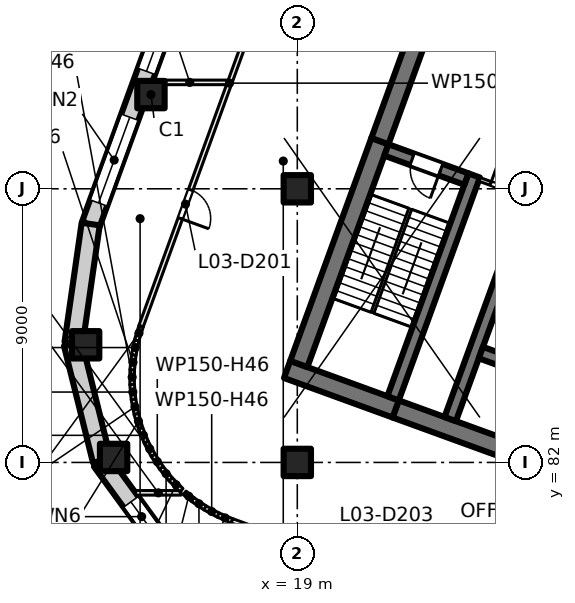
"""IFC4 building model, lengths in metres.
Left out: names, types, materials, properties, quantities, classifications, styles, units other than length and angle.
Written with IfcOpenShell. Run it as: python <this file> out.ifc"""

import sys

from ifc_helpers import new_model, si_unit, direction, frame, frame_2d, origin, origin_2d, place, context, subcontext, project, spatial, rectangle, extrude, element, fill, save


model = new_model("IFC4")
c1 = context("Model", 3, precision=1e-05, world=origin(), true_north=direction((0.0, 1.0)))
c2 = subcontext(c1, "Body", "Model", "MODEL_VIEW")
j1 = project(units=[si_unit("LENGTHUNIT", "METRE"), si_unit("PLANEANGLEUNIT", "RADIAN")], contexts=[c1])
p1 = place(None, origin())
s1 = spatial("IfcSite", under=j1, at=p1, CompositionType="ELEMENT")
p2 = place(p1, origin())
s2 = spatial("IfcBuilding", under=s1, at=p2, CompositionType="ELEMENT")
p3 = place(p2, frame((0.0, 0.0, 17.5)))
s3 = spatial("IfcBuildingStorey", under=s2, at=p3, CompositionType="ELEMENT", Elevation=17.5)
for number, where, z_axis, x_axis in (
    (1, (19.0, 82.0, 0.0), (0.0, 0.0, 1.0), (1.0, 0.0, 0.0)),
    (2, (19.0, 91.0, 0.0), (0.0, 0.0, 1.0), (1.0, 0.0, 0.0)),
    (3, (12.958, 82.164, 0.0), (0.0, 0.0, 1.0), (1.0, 0.0, 0.0)),
    (4, (12.038, 85.869, 0.0), (0.0, 0.0, 1.0), (1.0, 0.0, 0.0)),
    (5, (14.187, 94.099, 0.0), (0.0, 0.0, 1.0), (1.0, 0.0, 0.0)),
):
    element("IfcColumn", number, at=place(p3, frame(where, z_axis=z_axis, x_axis=x_axis)), inside=s3, PredefinedType="COLUMN", context=c2, shape_type="SweptSolid", body=[
        extrude(rectangle(XDim=0.9, YDim=0.9, at=origin_2d()), origin(), (0.0, 0.0, 1.0), 5.0),
    ])
p4 = place(p3, frame((35.767, 78.835, 0.0), z_axis=(0.0, 0.0, 1.0), x_axis=(-0.939692894512, 0.342019391267, 0.0)))
e6 = element("IfcWall", 6, at=p4, inside=s3, PredefinedType="SHEAR", context=c2, shape_type="SweptSolid", body=[
    extrude(rectangle(XDim=14.4, YDim=0.6, at=frame_2d((7.2, 0.0))), origin(), (0.0, 0.0, 1.0), 5.0),
])
p5 = place(p3, frame((22.236, 83.76, 0.0), z_axis=(0.0, 0.0, 1.0), x_axis=(-0.939680822529, 0.342052557032, 0.0)))
e7 = element("IfcWall", 7, at=p5, inside=s3, PredefinedType="SHEAR", context=c2, shape_type="SweptSolid", body=[
    extrude(rectangle(XDim=3.8, YDim=0.6, at=frame_2d((1.9, 0.0))), origin(), (0.0, 0.0, 1.0), 5.0),
])
p6 = place(p3, frame((19.05, 85.239, 0.0), z_axis=(0.0, 0.0, 1.0), x_axis=(0.342016982193, 0.939693771338, 0.0)))
e8 = element("IfcWall", 8, at=p6, inside=s3, PredefinedType="SHEAR", context=c2, shape_type="SweptSolid", body=[
    extrude(rectangle(XDim=7.8, YDim=0.6, at=frame_2d((3.9, 0.0))), origin(), (0.0, 0.0, 1.0), 5.0),
])
p7 = place(p3, frame((21.717, 92.568, 0.0), z_axis=(0.0, 0.0, 1.0), x_axis=(0.342016162452, 0.939694069696, 0.0)))
e9 = element("IfcWall", 9, at=p7, inside=s3, PredefinedType="SHEAR", context=c2, shape_type="SweptSolid", body=[
    extrude(rectangle(XDim=8.9, YDim=0.6, at=frame_2d((4.45, 0.0))), origin(), (0.0, 0.0, 1.0), 5.0),
])
p8 = place(p3, frame((22.15, 84.11, 0.0), z_axis=(0.0, 0.0, 1.0), x_axis=(0.342016982193, 0.939693771338, 0.0)))
e10 = element("IfcWall", 10, at=p8, inside=s3, PredefinedType="SHEAR", context=c2, shape_type="SweptSolid", body=[
    extrude(rectangle(XDim=7.8, YDim=0.4, at=frame_2d((3.9, 0.0))), origin(), (0.0, 0.0, 1.0), 5.0),
])
p9 = place(p3, frame((24.562, 91.32, 0.0), z_axis=(0.0, 0.0, 1.0), x_axis=(-0.939717030584, 0.341953070509, 0.0)))
e11 = element("IfcWall", 11, at=p9, inside=s3, PredefinedType="SHEAR", context=c2, shape_type="SweptSolid", body=[
    extrude(rectangle(XDim=2.8, YDim=0.4, at=frame_2d((1.4, 0.0))), origin(), (0.0, 0.0, 1.0), 5.0),
])
p10 = place(p9, frame((0.9, 0.0, 0.0)))
e12 = element("IfcOpeningElement", 12, at=p10, cuts=e11, PredefinedType="OPENING", context=c2, shape_type="SweptSolid", body=[
    extrude(rectangle(XDim=1.0, YDim=2.1, at=frame_2d((0.5, 1.05))), frame((0.0, 0.21, 0.0), z_axis=(0.0, -1.0, 0.0), x_axis=(1.0, 0.0, 0.0)), (0.0, 0.0, 1.0), 0.42),
])
p11 = place(p3, frame((24.03, 83.426, 0.0), z_axis=(0.0, 0.0, 1.0), x_axis=(0.342014590177, 0.939694641948, 0.0)))
e13 = element("IfcWall", 13, at=p11, inside=s3, PredefinedType="SHEAR", context=c2, shape_type="SweptSolid", body=[
    extrude(rectangle(XDim=12.2, YDim=0.4, at=frame_2d((6.1, 0.0))), origin(), (0.0, 0.0, 1.0), 5.0),
])
p12 = place(p11, frame((7.9, 0.0, 0.0)))
e14 = element("IfcOpeningElement", 14, at=p12, cuts=e13, PredefinedType="OPENING", context=c2, shape_type="SweptSolid", body=[
    extrude(rectangle(XDim=1.1, YDim=2.1, at=frame_2d((0.55, 1.05))), frame((0.0, 0.21, 0.0), z_axis=(0.0, -1.0, 0.0), x_axis=(1.0, 0.0, 0.0)), (0.0, 0.0, 1.0), 0.42),
])
p13 = place(p3, frame((27.858, 84.587, 0.0), z_axis=(0.0, 0.0, 1.0), x_axis=(-0.939686455819, 0.342037080957, 0.0)))
e15 = element("IfcWall", 15, at=p13, inside=s3, PredefinedType="SHEAR", context=c2, shape_type="SweptSolid", body=[
    extrude(rectangle(XDim=3.0, YDim=0.4, at=frame_2d((1.5, 0.0))), origin(), (0.0, 0.0, 1.0), 5.0),
])
p14 = place(p3, frame((12.199, 89.809, 0.0), z_axis=(0.0, 0.0, 1.0), x_axis=(0.342022998908, 0.939691581434, 0.0)))
e16 = element("IfcWall", 16, at=p14, inside=s3, PredefinedType="SOLIDWALL", context=c2, shape_type="SweptSolid", body=[
    extrude(rectangle(XDim=47.334, YDim=0.6, at=frame_2d((23.667, 0.0))), origin(), (0.0, 0.0, 1.0), 4.6),
])
p15 = place(p14, frame((0.773, 0.0, 0.9)))
e17 = element("IfcOpeningElement", 17, at=p15, cuts=e16, PredefinedType="OPENING", context=c2, shape_type="SweptSolid", body=[
    extrude(rectangle(XDim=3.0, YDim=3.0, at=frame_2d((1.5, 1.5))), frame((0.0, 0.31, 0.0), z_axis=(0.0, -1.0, 0.0), x_axis=(1.0, 0.0, 0.0)), (0.0, 0.0, 1.0), 0.62),
])
p16 = place(p14, frame((5.379, 0.0, 0.9)))
e18 = element("IfcOpeningElement", 18, at=p16, cuts=e16, PredefinedType="OPENING", context=c2, shape_type="SweptSolid", body=[
    extrude(rectangle(XDim=3.0, YDim=3.0, at=frame_2d((1.5, 1.5))), frame((0.0, 0.31, 0.0), z_axis=(0.0, -1.0, 0.0), x_axis=(1.0, 0.0, 0.0)), (0.0, 0.0, 1.0), 0.62),
])
p17 = place(p14, frame((9.235, 0.0, 0.9)))
e19 = element("IfcOpeningElement", 19, at=p17, cuts=e16, PredefinedType="OPENING", context=c2, shape_type="SweptSolid", body=[
    extrude(rectangle(XDim=3.0, YDim=3.0, at=frame_2d((1.5, 1.5))), frame((0.0, 0.31, 0.0), z_axis=(0.0, -1.0, 0.0), x_axis=(1.0, 0.0, 0.0)), (0.0, 0.0, 1.0), 0.62),
])
p18 = place(p14, frame((13.99, 0.0, 0.9)))
e20 = element("IfcOpeningElement", 20, at=p18, cuts=e16, PredefinedType="OPENING", context=c2, shape_type="SweptSolid", body=[
    extrude(rectangle(XDim=3.0, YDim=3.0, at=frame_2d((1.5, 1.5))), frame((0.0, 0.31, 0.0), z_axis=(0.0, -1.0, 0.0), x_axis=(1.0, 0.0, 0.0)), (0.0, 0.0, 1.0), 0.62),
])
p19 = place(p14, frame((18.118, 0.0, 0.9)))
e21 = element("IfcOpeningElement", 21, at=p19, cuts=e16, PredefinedType="OPENING", context=c2, shape_type="SweptSolid", body=[
    extrude(rectangle(XDim=1.2, YDim=3.0, at=frame_2d((0.6, 1.5))), frame((0.0, 0.31, 0.0), z_axis=(0.0, -1.0, 0.0), x_axis=(1.0, 0.0, 0.0)), (0.0, 0.0, 1.0), 0.62),
])
p20 = place(p14, frame((19.618, 0.0, 0.9)))
e22 = element("IfcOpeningElement", 22, at=p20, cuts=e16, PredefinedType="OPENING", context=c2, shape_type="SweptSolid", body=[
    extrude(rectangle(XDim=1.2, YDim=3.0, at=frame_2d((0.6, 1.5))), frame((0.0, 0.31, 0.0), z_axis=(0.0, -1.0, 0.0), x_axis=(1.0, 0.0, 0.0)), (0.0, 0.0, 1.0), 0.62),
])
p21 = place(p14, frame((22.452, 0.0, 0.9)))
e23 = element("IfcOpeningElement", 23, at=p21, cuts=e16, PredefinedType="OPENING", context=c2, shape_type="SweptSolid", body=[
    extrude(rectangle(XDim=3.0, YDim=3.0, at=frame_2d((1.5, 1.5))), frame((0.0, 0.31, 0.0), z_axis=(0.0, -1.0, 0.0), x_axis=(1.0, 0.0, 0.0)), (0.0, 0.0, 1.0), 0.62),
])
p22 = place(p14, frame((26.458, 0.0, 0.9)))
e24 = element("IfcOpeningElement", 24, at=p22, cuts=e16, PredefinedType="OPENING", context=c2, shape_type="SweptSolid", body=[
    extrude(rectangle(XDim=3.0, YDim=3.0, at=frame_2d((1.5, 1.5))), frame((0.0, 0.31, 0.0), z_axis=(0.0, -1.0, 0.0), x_axis=(1.0, 0.0, 0.0)), (0.0, 0.0, 1.0), 0.62),
])
p23 = place(p14, frame((32.484, 0.0, 0.9)))
e25 = element("IfcOpeningElement", 25, at=p23, cuts=e16, PredefinedType="OPENING", context=c2, shape_type="SweptSolid", body=[
    extrude(rectangle(XDim=1.2, YDim=3.0, at=frame_2d((0.6, 1.5))), frame((0.0, 0.31, 0.0), z_axis=(0.0, -1.0, 0.0), x_axis=(1.0, 0.0, 0.0)), (0.0, 0.0, 1.0), 0.62),
])
p24 = place(p14, frame((35.07, 0.0, 0.9)))
e26 = element("IfcOpeningElement", 26, at=p24, cuts=e16, PredefinedType="OPENING", context=c2, shape_type="SweptSolid", body=[
    extrude(rectangle(XDim=3.0, YDim=3.0, at=frame_2d((1.5, 1.5))), frame((0.0, 0.31, 0.0), z_axis=(0.0, -1.0, 0.0), x_axis=(1.0, 0.0, 0.0)), (0.0, 0.0, 1.0), 0.62),
])
p25 = place(p14, frame((39.676, 0.0, 0.9)))
e27 = element("IfcOpeningElement", 27, at=p25, cuts=e16, PredefinedType="OPENING", context=c2, shape_type="SweptSolid", body=[
    extrude(rectangle(XDim=3.0, YDim=3.0, at=frame_2d((1.5, 1.5))), frame((0.0, 0.31, 0.0), z_axis=(0.0, -1.0, 0.0), x_axis=(1.0, 0.0, 0.0)), (0.0, 0.0, 1.0), 0.62),
])
p26 = place(p14, frame((43.531, 0.0, 0.9)))
e28 = element("IfcOpeningElement", 28, at=p26, cuts=e16, PredefinedType="OPENING", context=c2, shape_type="SweptSolid", body=[
    extrude(rectangle(XDim=3.0, YDim=3.0, at=frame_2d((1.5, 1.5))), frame((0.0, 0.31, 0.0), z_axis=(0.0, -1.0, 0.0), x_axis=(1.0, 0.0, 0.0)), (0.0, 0.0, 1.0), 0.62),
])
p27 = place(p3, frame((11.641, 85.92, 0.0), z_axis=(0.0, 0.0, 1.0), x_axis=(0.142240980655, 0.989832058191, 0.0)))
e29 = element("IfcWall", 29, at=p27, inside=s3, PredefinedType="SOLIDWALL", context=c2, shape_type="SweptSolid", body=[
    extrude(rectangle(XDim=3.961, YDim=0.6, at=frame_2d((1.981, 0.0))), origin(), (0.0, 0.0, 1.0), 4.6),
])
p28 = place(p3, frame((12.571, 82.061, 0.0), z_axis=(0.0, 0.0, 1.0), x_axis=(-0.240896747667, 0.970550749298, 0.0)))
e30 = element("IfcWall", 30, at=p28, inside=s3, PredefinedType="SOLIDWALL", context=c2, shape_type="SweptSolid", body=[
    extrude(rectangle(XDim=3.962, YDim=0.6, at=frame_2d((1.981, 0.0))), origin(), (0.0, 0.0, 1.0), 4.6),
])
p29 = place(p3, frame((14.885, 78.837, 0.0), z_axis=(0.0, 0.0, 1.0), x_axis=(-0.588600339707, 0.808424170901, 0.0)))
e31 = element("IfcWall", 31, at=p29, inside=s3, PredefinedType="SOLIDWALL", context=c2, shape_type="SweptSolid", body=[
    extrude(rectangle(XDim=3.962, YDim=0.6, at=frame_2d((1.981, 0.0))), origin(), (0.0, 0.0, 1.0), 4.6),
])
p30 = place(p29, frame((1.108, 0.0, 0.9)))
e32 = element("IfcOpeningElement", 32, at=p30, cuts=e31, PredefinedType="OPENING", context=c2, shape_type="SweptSolid", body=[
    extrude(rectangle(XDim=1.2, YDim=3.0, at=frame_2d((0.6, 1.5))), frame((0.0, 0.31, 0.0), z_axis=(0.0, -1.0, 0.0), x_axis=(1.0, 0.0, 0.0)), (0.0, 0.0, 1.0), 0.62),
])
p31 = place(p3, frame((23.538, 96.694, 0.0), z_axis=(0.0, 0.0, 1.0), x_axis=(0.939691552312, -0.342023078919, 0.0)))
e33 = element("IfcWall", 33, at=p31, inside=s3, PredefinedType="PARTITIONING", context=c2, shape_type="SweptSolid", body=[
    extrude(rectangle(XDim=8.4, YDim=0.2, at=frame_2d((4.2, 0.0))), origin(), (0.0, 0.0, 1.0), 4.6),
])
p32 = place(p31, frame((1.65, 0.0, 0.0)))
e34 = element("IfcOpeningElement", 34, at=p32, cuts=e33, PredefinedType="OPENING", context=c2, shape_type="SweptSolid", body=[
    extrude(rectangle(XDim=1.5, YDim=2.1, at=frame_2d((0.75, 1.05))), frame((0.0, 0.11, 0.0), z_axis=(0.0, -1.0, 0.0), x_axis=(1.0, 0.0, 0.0)), (0.0, 0.0, 1.0), 0.22),
])
p33 = place(p3, frame((24.094, 98.221, 0.0), z_axis=(0.0, 0.0, 1.0), x_axis=(0.939691552312, -0.342023078919, 0.0)))
e35 = element("IfcWall", 35, at=p33, inside=s3, PredefinedType="PARTITIONING", context=c2, shape_type="SweptSolid", body=[
    extrude(rectangle(XDim=8.4, YDim=0.25, at=frame_2d((4.2, 0.0))), origin(), (0.0, 0.0, 1.0), 4.6),
])
p34 = place(p33, frame((6.625, 0.0, 0.0)))
e36 = element("IfcOpeningElement", 36, at=p34, cuts=e35, PredefinedType="OPENING", context=c2, shape_type="SweptSolid", body=[
    extrude(rectangle(XDim=0.8, YDim=2.1, at=frame_2d((0.4, 1.05))), frame((0.0, 0.135, 0.0), z_axis=(0.0, -1.0, 0.0), x_axis=(1.0, 0.0, 0.0)), (0.0, 0.0, 1.0), 0.27),
])
p35 = place(p33, frame((2.375, 0.0, 0.0)))
e37 = element("IfcOpeningElement", 37, at=p35, cuts=e35, PredefinedType="OPENING", context=c2, shape_type="SweptSolid", body=[
    extrude(rectangle(XDim=0.8, YDim=2.1, at=frame_2d((0.4, 1.05))), frame((0.0, 0.135, 0.0), z_axis=(0.0, -1.0, 0.0), x_axis=(1.0, 0.0, 0.0)), (0.0, 0.0, 1.0), 0.27),
])
p36 = place(p3, frame((24.985, 91.312, 0.0), z_axis=(0.0, 0.0, 1.0), x_axis=(0.939708740826, -0.341975850632, 0.0)))
e38 = element("IfcWall", 38, at=p36, inside=s3, PredefinedType="PARTITIONING", context=c2, shape_type="SweptSolid", body=[
    extrude(rectangle(XDim=1.6, YDim=0.125, at=frame_2d((0.8, 0.0))), origin(), (0.0, 0.0, 1.0), 4.6),
])
p37 = place(p36, frame((0.4, 0.0, 0.0)))
e39 = element("IfcOpeningElement", 39, at=p37, cuts=e38, PredefinedType="OPENING", context=c2, shape_type="SweptSolid", body=[
    extrude(rectangle(XDim=0.8, YDim=2.1, at=frame_2d((0.4, 1.05))), frame((0.0, 0.073, 0.0), z_axis=(0.0, -1.0, 0.0), x_axis=(1.0, 0.0, 0.0)), (0.0, 0.0, 1.0), 0.145),
])
p38 = place(p3, frame((13.567, 84.555, 0.0), z_axis=(0.0, 0.0, 1.0), x_axis=(0.006359949647, 0.999979775316, 0.0)))
e40 = element("IfcWall", 40, at=p38, inside=s3, PredefinedType="PARTITIONING", context=c2, shape_type="SweptSolid", body=[
    extrude(rectangle(XDim=0.499, YDim=0.15, at=frame_2d((0.25, 0.0))), origin(), (0.0, 0.0, 1.0), 4.6),
])
p39 = place(p3, frame((13.567, 84.563, 0.0), z_axis=(0.0, 0.0, 1.0), x_axis=(0.092612071084, -0.99570226689, 0.0)))
e41 = element("IfcWall", 41, at=p39, inside=s3, PredefinedType="PARTITIONING", context=c2, shape_type="SweptSolid", body=[
    extrude(rectangle(XDim=0.498, YDim=0.15, at=frame_2d((0.249, 0.0))), origin(), (0.0, 0.0, 1.0), 4.6),
])
p40 = place(p3, frame((13.57, 85.046, 0.0), z_axis=(0.0, 0.0, 1.0), x_axis=(0.102314560958, 0.994752095055, 0.0)))
e42 = element("IfcWall", 42, at=p40, inside=s3, PredefinedType="PARTITIONING", context=c2, shape_type="SweptSolid", body=[
    extrude(rectangle(XDim=0.499, YDim=0.15, at=frame_2d((0.25, 0.0))), origin(), (0.0, 0.0, 1.0), 4.6),
])
for number, where, z_axis, x_axis in (
    (43, (13.612, 84.075, 0.0), (0.0, 0.0, 1.0), (0.19, -0.982, 0.0)),
    (44, (13.62, 85.534, 0.0), (0.0, 0.0, 1.0), (0.2, 0.98, 0.0)),
):
    element("IfcWall", number, at=place(p3, frame(where, z_axis=z_axis, x_axis=x_axis)), inside=s3, PredefinedType="PARTITIONING", context=c2, shape_type="SweptSolid", body=[
        extrude(rectangle(XDim=0.499, YDim=0.15, at=frame_2d((0.25, 0.0))), origin(), (0.0, 0.0, 1.0), 4.6),
    ])
p41 = place(p3, frame((13.681, 81.0, 0.0), z_axis=(0.0, 0.0, 1.0), x_axis=(1.0, 0.0, 0.0)))
e45 = element("IfcWall", 45, at=p41, inside=s3, PredefinedType="PARTITIONING", context=c2, shape_type="SweptSolid", body=[
    extrude(rectangle(XDim=1.495, YDim=0.15, at=frame_2d((0.748, 0.0))), origin(), (0.0, 0.0, 1.0), 4.6),
])
p42 = place(p3, frame((13.705, 83.593, 0.0), z_axis=(0.0, 0.0, 1.0), x_axis=(0.285006811854, -0.958525491157, 0.0)))
e46 = element("IfcWall", 46, at=p42, inside=s3, PredefinedType="PARTITIONING", context=c2, shape_type="SweptSolid", body=[
    extrude(rectangle(XDim=0.498, YDim=0.15, at=frame_2d((0.249, 0.0))), origin(), (0.0, 0.0, 1.0), 4.6),
])
p43 = place(p3, frame((13.718, 86.015, 0.0), z_axis=(0.0, 0.0, 1.0), x_axis=(0.29553439104, 0.955332101268, 0.0)))
e47 = element("IfcWall", 47, at=p43, inside=s3, PredefinedType="PARTITIONING", context=c2, shape_type="SweptSolid", body=[
    extrude(rectangle(XDim=0.497, YDim=0.15, at=frame_2d((0.249, 0.0))), origin(), (0.0, 0.0, 1.0), 4.6),
])
p44 = place(p3, frame((13.845, 83.122, 0.0), z_axis=(0.0, 0.0, 1.0), x_axis=(0.37578481902, -0.926706949253, 0.0)))
e48 = element("IfcWall", 48, at=p44, inside=s3, PredefinedType="PARTITIONING", context=c2, shape_type="SweptSolid", body=[
    extrude(rectangle(XDim=0.498, YDim=0.15, at=frame_2d((0.249, 0.0))), origin(), (0.0, 0.0, 1.0), 4.6),
])
p45 = place(p3, frame((13.863, 86.486, 0.0), z_axis=(0.0, 0.0, 1.0), x_axis=(0.342040480313, 0.939685218478, 0.0)))
e49 = element("IfcWall", 49, at=p45, inside=s3, PredefinedType="PARTITIONING", context=c2, shape_type="SweptSolid", body=[
    extrude(rectangle(XDim=17.004, YDim=0.15, at=frame_2d((8.502, 0.0))), origin(), (0.0, 0.0, 1.0), 4.6),
])
p46 = place(p45, frame((3.767, 0.0, 0.0)))
e50 = element("IfcOpeningElement", 50, at=p46, cuts=e49, PredefinedType="OPENING", context=c2, shape_type="SweptSolid", body=[
    extrude(rectangle(XDim=1.0, YDim=2.1, at=frame_2d((0.5, 1.05))), frame((0.0, 0.085, 0.0), z_axis=(0.0, -1.0, 0.0), x_axis=(1.0, 0.0, 0.0)), (0.0, 0.0, 1.0), 0.17),
])
p47 = place(p45, frame((12.263, 0.0, 0.0)))
e51 = element("IfcOpeningElement", 51, at=p47, cuts=e49, PredefinedType="OPENING", context=c2, shape_type="SweptSolid", body=[
    extrude(rectangle(XDim=1.0, YDim=2.1, at=frame_2d((0.5, 1.05))), frame((0.0, 0.085, 0.0), z_axis=(0.0, -1.0, 0.0), x_axis=(1.0, 0.0, 0.0)), (0.0, 0.0, 1.0), 0.17),
])
p48 = place(p3, frame((14.029, 82.667, 0.0), z_axis=(0.0, 0.0, 1.0), x_axis=(0.468700159313, -0.883357323318, 0.0)))
e52 = element("IfcWall", 52, at=p48, inside=s3, PredefinedType="PARTITIONING", context=c2, shape_type="SweptSolid", body=[
    extrude(rectangle(XDim=0.497, YDim=0.15, at=frame_2d((0.249, 0.0))), origin(), (0.0, 0.0, 1.0), 4.6),
])
p49 = place(p3, frame((14.226, 94.5, 0.0), z_axis=(0.0, 0.0, 1.0), x_axis=(1.0, 0.0, 0.0)))
e53 = element("IfcWall", 53, at=p49, inside=s3, PredefinedType="PARTITIONING", context=c2, shape_type="SweptSolid", body=[
    extrude(rectangle(XDim=2.474, YDim=0.15, at=frame_2d((1.237, 0.0))), origin(), (0.0, 0.0, 1.0), 4.6),
])
for number, where, z_axis, x_axis in (
    (54, (14.258, 82.234, 0.0), (0.0, 0.0, 1.0), (0.55, -0.835, 0.0)),
    (55, (14.528, 81.824, 0.0), (0.0, 0.0, 1.0), (0.629, -0.778, 0.0)),
):
    element("IfcWall", number, at=place(p3, frame(where, z_axis=z_axis, x_axis=x_axis)), inside=s3, PredefinedType="PARTITIONING", context=c2, shape_type="SweptSolid", body=[
        extrude(rectangle(XDim=0.498, YDim=0.15, at=frame_2d((0.249, 0.0))), origin(), (0.0, 0.0, 1.0), 4.6),
    ])
p50 = place(p3, frame((14.836, 81.443, 0.0), z_axis=(0.0, 0.0, 1.0), x_axis=(0.702939506556, -0.711249639805, 0.0)))
e56 = element("IfcWall", 56, at=p50, inside=s3, PredefinedType="PARTITIONING", context=c2, shape_type="SweptSolid", body=[
    extrude(rectangle(XDim=0.5, YDim=0.15, at=frame_2d((0.25, 0.0))), origin(), (0.0, 0.0, 1.0), 4.6),
])
p51 = place(p3, frame((15.294, 81.0, 0.0), z_axis=(0.0, 0.0, 1.0), x_axis=(0.770605931108, -0.637311932213, 0.0)))
e57 = element("IfcWall", 57, at=p51, inside=s3, PredefinedType="PARTITIONING", context=c2, shape_type="SweptSolid", body=[
    extrude(rectangle(XDim=0.352, YDim=0.15, at=frame_2d((0.176, 0.0))), origin(), (0.0, 0.0, 1.0), 4.6),
])
p52 = place(p3, frame((15.559, 80.78, 0.0), z_axis=(0.0, 0.0, 1.0), x_axis=(0.828490672822, -0.560002861641, 0.0)))
e58 = element("IfcWall", 58, at=p52, inside=s3, PredefinedType="PARTITIONING", context=c2, shape_type="SweptSolid", body=[
    extrude(rectangle(XDim=0.498, YDim=0.15, at=frame_2d((0.249, 0.0))), origin(), (0.0, 0.0, 1.0), 4.6),
])
p53 = place(p3, frame((15.966, 80.505, 0.0), z_axis=(0.0, 0.0, 1.0), x_axis=(0.878382708813, -0.477957965577, 0.0)))
e59 = element("IfcWall", 59, at=p53, inside=s3, PredefinedType="PARTITIONING", context=c2, shape_type="SweptSolid", body=[
    extrude(rectangle(XDim=0.498, YDim=0.15, at=frame_2d((0.249, 0.0))), origin(), (0.0, 0.0, 1.0), 4.6),
])
p54 = place(p3, frame((16.397, 80.27, 0.0), z_axis=(0.0, 0.0, 1.0), x_axis=(0.921848433773, -0.387550596891, 0.0)))
e60 = element("IfcWall", 60, at=p54, inside=s3, PredefinedType="PARTITIONING", context=c2, shape_type="SweptSolid", body=[
    extrude(rectangle(XDim=0.496, YDim=0.15, at=frame_2d((0.248, 0.0))), origin(), (0.0, 0.0, 1.0), 4.6),
])
p55 = place(p3, frame((37.528, 72.554, 0.0), z_axis=(0.0, 0.0, 1.0), x_axis=(-0.939693287343, 0.34201831197, 0.0)))
e61 = element("IfcWall", 61, at=p55, inside=s3, PredefinedType="PARTITIONING", context=c2, shape_type="SweptSolid", body=[
    extrude(rectangle(XDim=22.005, YDim=0.15, at=frame_2d((11.002, 0.0))), origin(), (0.0, 0.0, 1.0), 4.6),
])
p56 = place(p55, frame((16.101, 0.0, 0.0)))
e62 = element("IfcOpeningElement", 62, at=p56, cuts=e61, PredefinedType="OPENING", context=c2, shape_type="SweptSolid", body=[
    extrude(rectangle(XDim=1.0, YDim=2.1, at=frame_2d((0.5, 1.05))), frame((0.0, 0.085, 0.0), z_axis=(0.0, -1.0, 0.0), x_axis=(1.0, 0.0, 0.0)), (0.0, 0.0, 1.0), 0.17),
])
p57 = place(p55, frame((5.105, 0.0, 0.0)))
e63 = element("IfcOpeningElement", 63, at=p57, cuts=e61, PredefinedType="OPENING", context=c2, shape_type="SweptSolid", body=[
    extrude(rectangle(XDim=1.0, YDim=2.1, at=frame_2d((0.5, 1.05))), frame((0.0, 0.085, 0.0), z_axis=(0.0, -1.0, 0.0), x_axis=(1.0, 0.0, 0.0)), (0.0, 0.0, 1.0), 0.17),
])
p58 = place(p15, origin())
e64 = element("IfcWindow", 64, at=p58, inside=s3, PartitioningType="SINGLE_PANEL", PredefinedType="WINDOW", context=c2, shape_type="SweptSolid", body=[
    extrude(rectangle(XDim=3.0, YDim=3.0, at=frame_2d((1.5, 1.5))), frame((0.0, 0.03, 0.0), z_axis=(0.0, -1.0, 0.0), x_axis=(1.0, 0.0, 0.0)), (0.0, 0.0, 1.0), 0.06),
])
fill(e17, e64)
p59 = place(p16, origin())
e65 = element("IfcWindow", 65, at=p59, inside=s3, PartitioningType="SINGLE_PANEL", PredefinedType="WINDOW", context=c2, shape_type="SweptSolid", body=[
    extrude(rectangle(XDim=3.0, YDim=3.0, at=frame_2d((1.5, 1.5))), frame((0.0, 0.03, 0.0), z_axis=(0.0, -1.0, 0.0), x_axis=(1.0, 0.0, 0.0)), (0.0, 0.0, 1.0), 0.06),
])
fill(e18, e65)
p60 = place(p30, origin())
e66 = element("IfcWindow", 66, at=p60, inside=s3, PartitioningType="SINGLE_PANEL", PredefinedType="WINDOW", context=c2, shape_type="SweptSolid", body=[
    extrude(rectangle(XDim=1.2, YDim=3.0, at=frame_2d((0.6, 1.5))), frame((0.0, 0.03, 0.0), z_axis=(0.0, -1.0, 0.0), x_axis=(1.0, 0.0, 0.0)), (0.0, 0.0, 1.0), 0.06),
])
fill(e32, e66)
p61 = place(p10, origin())
e67 = element("IfcDoor", 67, at=p61, inside=s3, OperationType="SINGLE_SWING_LEFT", PredefinedType="DOOR", context=c2, shape_type="SweptSolid", body=[
    extrude(rectangle(XDim=1.0, YDim=2.1, at=frame_2d((0.5, 1.05))), frame((0.0, 0.025, 0.0), z_axis=(0.0, -1.0, 0.0), x_axis=(1.0, 0.0, 0.0)), (0.0, 0.0, 1.0), 0.05),
])
fill(e12, e67)
p62 = place(p37, origin())
e68 = element("IfcDoor", 68, at=p62, inside=s3, OperationType="SINGLE_SWING_RIGHT", PredefinedType="DOOR", context=c2, shape_type="SweptSolid", body=[
    extrude(rectangle(XDim=0.8, YDim=2.1, at=frame_2d((0.4, 1.05))), frame((0.0, 0.025, 0.0), z_axis=(0.0, -1.0, 0.0), x_axis=(1.0, 0.0, 0.0)), (0.0, 0.0, 1.0), 0.05),
])
fill(e39, e68)
p63 = place(p46, origin())
e69 = element("IfcDoor", 69, at=p63, inside=s3, OperationType="SINGLE_SWING_LEFT", PredefinedType="DOOR", context=c2, shape_type="SweptSolid", body=[
    extrude(rectangle(XDim=1.0, YDim=2.1, at=frame_2d((0.5, 1.05))), frame((0.0, 0.025, 0.0), z_axis=(0.0, -1.0, 0.0), x_axis=(1.0, 0.0, 0.0)), (0.0, 0.0, 1.0), 0.05),
])
fill(e50, e69)
save(model, sys.argv[1])
